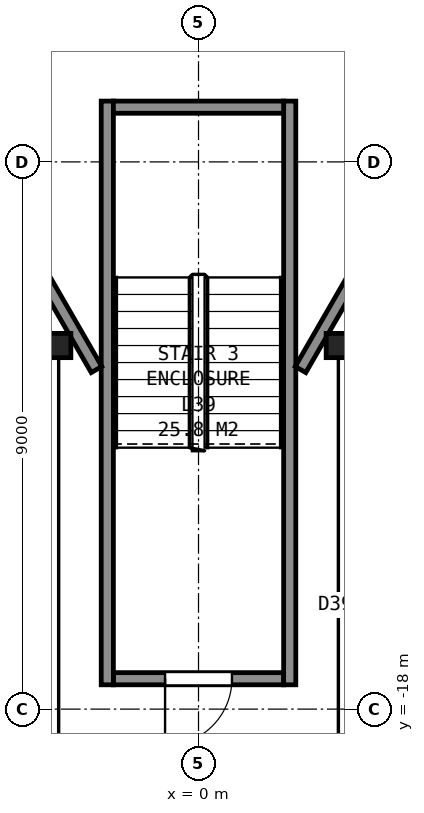
"""IFC4 building model, lengths in metres.
Left out: names, types, materials, properties, quantities, classifications, styles, units other than length and angle.
Written with IfcOpenShell. Run it as: python <this file> out.ifc"""

import sys

from ifc_helpers import new_model, si_unit, direction, frame, frame_2d, origin, origin_2d, place, context, subcontext, project, spatial, rectangle, i_section, extrude, element, fill, save


model = new_model("IFC4")
c1 = context("Model", 3, precision=1e-05, world=origin(), true_north=direction((0.0, 1.0)))
c2 = subcontext(c1, "Body", "Model", "MODEL_VIEW")
j1 = project(units=[si_unit("LENGTHUNIT", "METRE"), si_unit("PLANEANGLEUNIT", "RADIAN")], contexts=[c1])
p1 = place(None, origin())
s1 = spatial("IfcSite", under=j1, at=p1, CompositionType="ELEMENT")
p2 = place(p1, origin())
s2 = spatial("IfcBuilding", under=s1, at=p2, CompositionType="ELEMENT")
p3 = place(p2, frame((0.0, 0.0, 159.9)))
s3 = spatial("IfcBuildingStorey", under=s2, at=p3, CompositionType="ELEMENT", Elevation=159.9)
for number, where, z_axis, x_axis in (
    (1, (-2.3, -12.02, 0.0), (0.0, 0.0, 1.0), (1.0, 0.0, 0.0)),
    (2, (2.3, -12.02, 0.0), (0.0, 0.0, 1.0), (1.0, 0.0, 0.0)),
):
    element("IfcColumn", number, at=place(p3, frame(where, z_axis=z_axis, x_axis=x_axis)), inside=s3, PredefinedType="COLUMN", context=c2, shape_type="SweptSolid", body=[
        extrude(i_section(OverallWidth=0.401, OverallDepth=0.399, WebThickness=0.025, FlangeThickness=0.04, FilletRadius=0.015, at=origin_2d()), origin(), (0.0, 0.0, 1.0), 3.7),
    ])
p4 = place(p3, frame((-1.4, -17.5, 0.0), z_axis=(0.0, 0.0, 1.0), x_axis=(1.0, 0.0, 0.0)))
e3 = element("IfcWall", 3, at=p4, inside=s3, PredefinedType="PARTITIONING", context=c2, shape_type="SweptSolid", body=[
    extrude(rectangle(XDim=2.8, YDim=0.2, at=frame_2d((1.4, 0.0))), origin(), (0.0, 0.0, 1.0), 3.45),
])
p5 = place(p4, frame((0.85, 0.0, 0.0)))
e4 = element("IfcOpeningElement", 4, at=p5, cuts=e3, PredefinedType="OPENING", context=c2, shape_type="SweptSolid", body=[
    extrude(rectangle(XDim=1.1, YDim=2.1, at=frame_2d((0.55, 1.05))), frame((0.0, 0.11, 0.0), z_axis=(0.0, -1.0, 0.0), x_axis=(1.0, 0.0, 0.0)), (0.0, 0.0, 1.0), 0.22),
])
for number, where, z_axis, x_axis in (
    (5, (1.5, -8.0, 0.0), (0.0, 0.0, 1.0), (0.0, -1.0, 0.0)),
    (6, (-1.5, -8.0, 0.0), (0.0, 0.0, 1.0), (0.0, -1.0, 0.0)),
):
    element("IfcWall", number, at=place(p3, frame(where, z_axis=z_axis, x_axis=x_axis)), inside=s3, PredefinedType="PARTITIONING", context=c2, shape_type="SweptSolid", body=[
        extrude(rectangle(XDim=9.6, YDim=0.2, at=frame_2d((4.8, 0.0))), origin(), (0.0, 0.0, 1.0), 3.45),
    ])
p6 = place(p3, frame((-1.4, -8.1, 0.0), z_axis=(0.0, 0.0, 1.0), x_axis=(1.0, 0.0, 0.0)))
e7 = element("IfcWall", 7, at=p6, inside=s3, PredefinedType="PARTITIONING", context=c2, shape_type="SweptSolid", body=[
    extrude(rectangle(XDim=2.8, YDim=0.2, at=frame_2d((1.4, 0.0))), origin(), (0.0, 0.0, 1.0), 3.45),
])
p7 = place(p3, frame((-4.655, -7.257, 0.0), z_axis=(0.0, 0.0, 1.0), x_axis=(0.499966124405, -0.866044960985, 0.0)))
e8 = element("IfcWall", 8, at=p7, inside=s3, PredefinedType="PARTITIONING", context=c2, shape_type="SweptSolid", body=[
    extrude(rectangle(XDim=5.956, YDim=0.2, at=frame_2d((2.978, 0.0))), origin(), (0.0, 0.0, 1.0), 3.45),
])
p8 = place(p3, frame((1.677, -12.415, 0.0), z_axis=(0.0, 0.0, 1.0), x_axis=(0.500054337157, 0.865994029939, 0.0)))
e9 = element("IfcWall", 9, at=p8, inside=s3, PredefinedType="PARTITIONING", context=c2, shape_type="SweptSolid", body=[
    extrude(rectangle(XDim=6.177, YDim=0.2, at=frame_2d((3.088, 0.0))), origin(), (0.0, 0.0, 1.0), 3.45),
])
p9 = place(p8, frame((3.695, 0.0, 0.0)))
e10 = element("IfcOpeningElement", 10, at=p9, cuts=e9, PredefinedType="OPENING", context=c2, shape_type="SweptSolid", body=[
    extrude(rectangle(XDim=1.8, YDim=2.1, at=frame_2d((0.9, 1.05))), frame((0.0, 0.11, 0.0), z_axis=(0.0, -1.0, 0.0), x_axis=(1.0, 0.0, 0.0)), (0.0, 0.0, 1.0), 0.22),
])
p10 = place(p5, origin())
e11 = element("IfcDoor", 11, at=p10, inside=s3, OperationType="SINGLE_SWING_LEFT", PredefinedType="DOOR", context=c2, shape_type="SweptSolid", body=[
    extrude(rectangle(XDim=1.1, YDim=2.1, at=frame_2d((0.55, 1.05))), frame((0.0, 0.025, 0.0), z_axis=(0.0, -1.0, 0.0), x_axis=(1.0, 0.0, 0.0)), (0.0, 0.0, 1.0), 0.05),
])
fill(e4, e11)
save(model, sys.argv[1])
